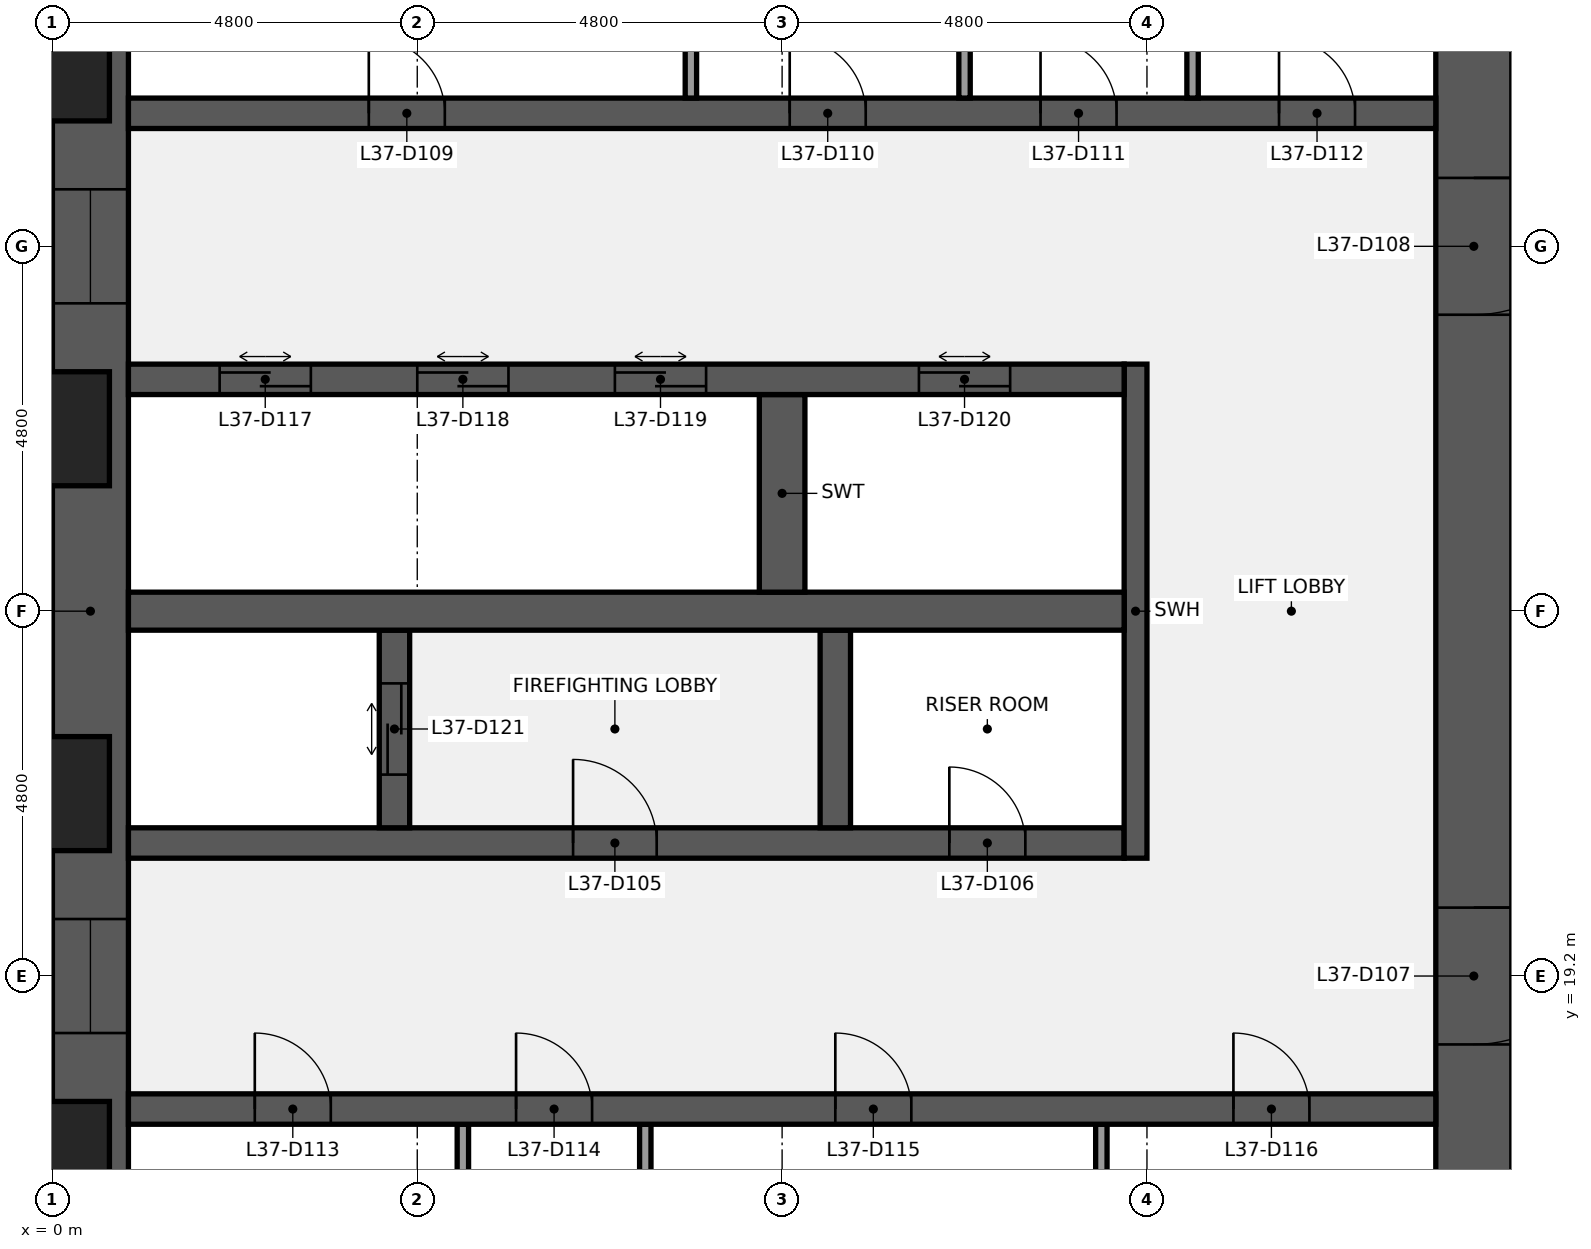
"""IFC4 building model, lengths in metres.
Left out: names, types, materials, properties, quantities, classifications, styles, units other than length and angle.
Written with IfcOpenShell. Run it as: python <this file> out.ifc"""

import sys

from ifc_helpers import new_model, si_unit, direction, frame, frame_2d, origin, place, context, subcontext, project, spatial, rectangle, extrude, element, fill, save


model = new_model("IFC4")
c1 = context("Model", 3, precision=1e-05, world=origin(), true_north=direction((0.0, 1.0)))
c2 = subcontext(c1, "Body", "Model", "MODEL_VIEW")
j1 = project(units=[si_unit("LENGTHUNIT", "METRE"), si_unit("PLANEANGLEUNIT", "RADIAN")], contexts=[c1])
p1 = place(None, origin())
s1 = spatial("IfcSite", under=j1, at=p1, CompositionType="ELEMENT")
p2 = place(p1, origin())
s2 = spatial("IfcBuilding", under=s1, at=p2, CompositionType="ELEMENT")
p3 = place(p2, frame((0.0, 0.0, 168.1)))
s3 = spatial("IfcBuildingStorey", under=s2, at=p3, CompositionType="ELEMENT", Elevation=168.1)
p4 = place(p3, frame((0.5, 9.6, 0.0), z_axis=(0.0, 0.0, 1.0), x_axis=(0.0, 1.0, 0.0)))
e1 = element("IfcWall", 1, at=p4, inside=s3, PredefinedType="SHEAR", context=c2, shape_type="SweptSolid", body=[
    extrude(rectangle(XDim=28.8, YDim=1.0, at=frame_2d((14.4, 0.0))), origin(), (0.0, 0.0, 1.0), 3.84),
])
p5 = place(p4, frame((8.85, 0.0, 0.9)))
e2 = element("IfcOpeningElement", 2, at=p5, cuts=e1, PredefinedType="OPENING", context=c2, shape_type="SweptSolid", body=[
    extrude(rectangle(XDim=1.5, YDim=1.5, at=frame_2d((0.75, 0.75))), frame((0.0, 0.51, 0.0), z_axis=(0.0, -1.0, 0.0), x_axis=(1.0, 0.0, 0.0)), (0.0, 0.0, 1.0), 1.02),
])
p6 = place(p4, frame((18.45, 0.0, 0.9)))
e3 = element("IfcOpeningElement", 3, at=p6, cuts=e1, PredefinedType="OPENING", context=c2, shape_type="SweptSolid", body=[
    extrude(rectangle(XDim=1.5, YDim=1.5, at=frame_2d((0.75, 0.75))), frame((0.0, 0.51, 0.0), z_axis=(0.0, -1.0, 0.0), x_axis=(1.0, 0.0, 0.0)), (0.0, 0.0, 1.0), 1.02),
])
p7 = place(p3, frame((18.7, 38.4, 0.0), z_axis=(0.0, 0.0, 1.0), x_axis=(0.0, -1.0, 0.0)))
e4 = element("IfcWall", 4, at=p7, inside=s3, PredefinedType="SHEAR", context=c2, shape_type="SweptSolid", body=[
    extrude(rectangle(XDim=28.8, YDim=1.0, at=frame_2d((14.4, 0.0))), origin(), (0.0, 0.0, 1.0), 3.84),
])
p8 = place(p7, frame((18.3, 0.0, 0.0)))
e5 = element("IfcOpeningElement", 5, at=p8, cuts=e4, PredefinedType="OPENING", context=c2, shape_type="SweptSolid", body=[
    extrude(rectangle(XDim=1.8, YDim=2.1, at=frame_2d((0.9, 1.05))), frame((0.0, 0.51, 0.0), z_axis=(0.0, -1.0, 0.0), x_axis=(1.0, 0.0, 0.0)), (0.0, 0.0, 1.0), 1.02),
])
p9 = place(p7, frame((8.7, 0.0, 0.0)))
e6 = element("IfcOpeningElement", 6, at=p9, cuts=e4, PredefinedType="OPENING", context=c2, shape_type="SweptSolid", body=[
    extrude(rectangle(XDim=1.8, YDim=2.1, at=frame_2d((0.9, 1.05))), frame((0.0, 0.51, 0.0), z_axis=(0.0, -1.0, 0.0), x_axis=(1.0, 0.0, 0.0)), (0.0, 0.0, 1.0), 1.02),
])
for number, where, z_axis, x_axis in (
    (7, (5.4, 14.65, 0.0), (0.0, 0.0, 1.0), (0.0, 1.0, 0.0)),
    (8, (7.8, 14.65, 0.0), (0.0, 0.0, 1.0), (0.0, 1.0, 0.0)),
    (9, (13.8, 14.65, 0.0), (0.0, 0.0, 1.0), (0.0, 1.0, 0.0)),
):
    element("IfcWall", number, at=place(p3, frame(where, z_axis=z_axis, x_axis=x_axis)), inside=s3, PredefinedType="PARTITIONING", context=c2, shape_type="SweptSolid", body=[
        extrude(rectangle(XDim=2.6, YDim=0.15, at=frame_2d((1.3, 0.0))), origin(), (0.0, 0.0, 1.0), 3.84),
    ])
p10 = place(p3, frame((1.0, 17.45, 0.0), z_axis=(0.0, 0.0, 1.0), x_axis=(1.0, 0.0, 0.0)))
e10 = element("IfcWall", 10, at=p10, inside=s3, PredefinedType="SHEAR", context=c2, shape_type="SweptSolid", body=[
    extrude(rectangle(XDim=17.2, YDim=0.4, at=frame_2d((8.6, 0.0))), origin(), (0.0, 0.0, 1.0), 3.84),
])
p11 = place(p10, frame((1.663, 0.0, 0.0)))
e11 = element("IfcOpeningElement", 11, at=p11, cuts=e10, PredefinedType="OPENING", context=c2, shape_type="SweptSolid", body=[
    extrude(rectangle(XDim=1.0, YDim=2.1, at=frame_2d((0.5, 1.05))), frame((0.0, 0.21, 0.0), z_axis=(0.0, -1.0, 0.0), x_axis=(1.0, 0.0, 0.0)), (0.0, 0.0, 1.0), 0.42),
])
p12 = place(p10, frame((5.1, 0.0, 0.0)))
e12 = element("IfcOpeningElement", 12, at=p12, cuts=e10, PredefinedType="OPENING", context=c2, shape_type="SweptSolid", body=[
    extrude(rectangle(XDim=1.0, YDim=2.1, at=frame_2d((0.5, 1.05))), frame((0.0, 0.21, 0.0), z_axis=(0.0, -1.0, 0.0), x_axis=(1.0, 0.0, 0.0)), (0.0, 0.0, 1.0), 0.42),
])
p13 = place(p10, frame((9.3, 0.0, 0.0)))
e13 = element("IfcOpeningElement", 13, at=p13, cuts=e10, PredefinedType="OPENING", context=c2, shape_type="SweptSolid", body=[
    extrude(rectangle(XDim=1.0, YDim=2.1, at=frame_2d((0.5, 1.05))), frame((0.0, 0.21, 0.0), z_axis=(0.0, -1.0, 0.0), x_axis=(1.0, 0.0, 0.0)), (0.0, 0.0, 1.0), 0.42),
])
p14 = place(p10, frame((14.538, 0.0, 0.0)))
e14 = element("IfcOpeningElement", 14, at=p14, cuts=e10, PredefinedType="OPENING", context=c2, shape_type="SweptSolid", body=[
    extrude(rectangle(XDim=1.0, YDim=2.1, at=frame_2d((0.5, 1.05))), frame((0.0, 0.21, 0.0), z_axis=(0.0, -1.0, 0.0), x_axis=(1.0, 0.0, 0.0)), (0.0, 0.0, 1.0), 0.42),
])
p15 = place(p3, frame((1.0, 20.95, 0.0), z_axis=(0.0, 0.0, 1.0), x_axis=(1.0, 0.0, 0.0)))
e15 = element("IfcWall", 15, at=p15, inside=s3, PredefinedType="SHEAR", context=c2, shape_type="SweptSolid", body=[
    extrude(rectangle(XDim=13.1, YDim=0.4, at=frame_2d((6.55, 0.0))), origin(), (0.0, 0.0, 1.0), 3.84),
])
p16 = place(p15, frame((5.85, 0.0, 0.0)))
e16 = element("IfcOpeningElement", 16, at=p16, cuts=e15, PredefinedType="OPENING", context=c2, shape_type="SweptSolid", body=[
    extrude(rectangle(XDim=1.1, YDim=2.1, at=frame_2d((0.55, 1.05))), frame((0.0, 0.21, 0.0), z_axis=(0.0, -1.0, 0.0), x_axis=(1.0, 0.0, 0.0)), (0.0, 0.0, 1.0), 0.42),
])
p17 = place(p15, frame((10.8, 0.0, 0.0)))
e17 = element("IfcOpeningElement", 17, at=p17, cuts=e15, PredefinedType="OPENING", context=c2, shape_type="SweptSolid", body=[
    extrude(rectangle(XDim=1.0, YDim=2.1, at=frame_2d((0.5, 1.05))), frame((0.0, 0.21, 0.0), z_axis=(0.0, -1.0, 0.0), x_axis=(1.0, 0.0, 0.0)), (0.0, 0.0, 1.0), 0.42),
])
p18 = place(p3, frame((14.25, 20.75, 0.0), z_axis=(0.0, 0.0, 1.0), x_axis=(0.0, 1.0, 0.0)))
e18 = element("IfcWall", 18, at=p18, inside=s3, PredefinedType="SHEAR", context=c2, shape_type="SweptSolid", body=[
    extrude(rectangle(XDim=6.5, YDim=0.3, at=frame_2d((3.25, 0.0))), origin(), (0.0, 0.0, 1.0), 3.84),
])
p19 = place(p3, frame((4.5, 21.15, 0.0), z_axis=(0.0, 0.0, 1.0), x_axis=(0.0, 1.0, 0.0)))
e19 = element("IfcWall", 19, at=p19, inside=s3, PredefinedType="SHEAR", context=c2, shape_type="SweptSolid", body=[
    extrude(rectangle(XDim=2.6, YDim=0.4, at=frame_2d((1.3, 0.0))), origin(), (0.0, 0.0, 1.0), 3.84),
])
p20 = place(p19, frame((0.7, 0.0, 0.0)))
e20 = element("IfcOpeningElement", 20, at=p20, cuts=e19, PredefinedType="OPENING", context=c2, shape_type="SweptSolid", body=[
    extrude(rectangle(XDim=1.2, YDim=2.1, at=frame_2d((0.6, 1.05))), frame((0.0, 0.21, 0.0), z_axis=(0.0, -1.0, 0.0), x_axis=(1.0, 0.0, 0.0)), (0.0, 0.0, 1.0), 0.42),
])
p21 = place(p3, frame((10.3, 21.15, 0.0), z_axis=(0.0, 0.0, 1.0), x_axis=(0.0, 1.0, 0.0)))
e21 = element("IfcWall", 21, at=p21, inside=s3, PredefinedType="SHEAR", context=c2, shape_type="SweptSolid", body=[
    extrude(rectangle(XDim=2.6, YDim=0.4, at=frame_2d((1.3, 0.0))), origin(), (0.0, 0.0, 1.0), 3.84),
])
p22 = place(p3, frame((1.0, 24.0, 0.0), z_axis=(0.0, 0.0, 1.0), x_axis=(1.0, 0.0, 0.0)))
e22 = element("IfcWall", 22, at=p22, inside=s3, PredefinedType="SHEAR", context=c2, shape_type="SweptSolid", body=[
    extrude(rectangle(XDim=13.1, YDim=0.5, at=frame_2d((6.55, 0.0))), origin(), (0.0, 0.0, 1.0), 3.84),
])
p23 = place(p3, frame((9.6, 24.25, 0.0), z_axis=(0.0, 0.0, 1.0), x_axis=(0.0, 1.0, 0.0)))
e23 = element("IfcWall", 23, at=p23, inside=s3, PredefinedType="SHEAR", context=c2, shape_type="SweptSolid", body=[
    extrude(rectangle(XDim=2.6, YDim=0.6, at=frame_2d((1.3, 0.0))), origin(), (0.0, 0.0, 1.0), 3.84),
])
p24 = place(p3, frame((1.0, 27.05, 0.0), z_axis=(0.0, 0.0, 1.0), x_axis=(1.0, 0.0, 0.0)))
e24 = element("IfcWall", 24, at=p24, inside=s3, PredefinedType="SHEAR", context=c2, shape_type="SweptSolid", body=[
    extrude(rectangle(XDim=13.1, YDim=0.4, at=frame_2d((6.55, 0.0))), origin(), (0.0, 0.0, 1.0), 3.84),
])
p25 = place(p24, frame((1.2, 0.0, 0.0)))
e25 = element("IfcOpeningElement", 25, at=p25, cuts=e24, PredefinedType="OPENING", context=c2, shape_type="SweptSolid", body=[
    extrude(rectangle(XDim=1.2, YDim=2.1, at=frame_2d((0.6, 1.05))), frame((0.0, 0.21, 0.0), z_axis=(0.0, -1.0, 0.0), x_axis=(1.0, 0.0, 0.0)), (0.0, 0.0, 1.0), 0.42),
])
p26 = place(p24, frame((3.8, 0.0, 0.0)))
e26 = element("IfcOpeningElement", 26, at=p26, cuts=e24, PredefinedType="OPENING", context=c2, shape_type="SweptSolid", body=[
    extrude(rectangle(XDim=1.2, YDim=2.1, at=frame_2d((0.6, 1.05))), frame((0.0, 0.21, 0.0), z_axis=(0.0, -1.0, 0.0), x_axis=(1.0, 0.0, 0.0)), (0.0, 0.0, 1.0), 0.42),
])
p27 = place(p24, frame((6.4, 0.0, 0.0)))
e27 = element("IfcOpeningElement", 27, at=p27, cuts=e24, PredefinedType="OPENING", context=c2, shape_type="SweptSolid", body=[
    extrude(rectangle(XDim=1.2, YDim=2.1, at=frame_2d((0.6, 1.05))), frame((0.0, 0.21, 0.0), z_axis=(0.0, -1.0, 0.0), x_axis=(1.0, 0.0, 0.0)), (0.0, 0.0, 1.0), 0.42),
])
p28 = place(p24, frame((10.4, 0.0, 0.0)))
e28 = element("IfcOpeningElement", 28, at=p28, cuts=e24, PredefinedType="OPENING", context=c2, shape_type="SweptSolid", body=[
    extrude(rectangle(XDim=1.2, YDim=2.1, at=frame_2d((0.6, 1.05))), frame((0.0, 0.21, 0.0), z_axis=(0.0, -1.0, 0.0), x_axis=(1.0, 0.0, 0.0)), (0.0, 0.0, 1.0), 0.42),
])
p29 = place(p3, frame((1.0, 30.55, 0.0), z_axis=(0.0, 0.0, 1.0), x_axis=(1.0, 0.0, 0.0)))
e29 = element("IfcWall", 29, at=p29, inside=s3, PredefinedType="SHEAR", context=c2, shape_type="SweptSolid", body=[
    extrude(rectangle(XDim=17.2, YDim=0.4, at=frame_2d((8.6, 0.0))), origin(), (0.0, 0.0, 1.0), 3.84),
])
p30 = place(p29, frame((3.163, 0.0, 0.0)))
e30 = element("IfcOpeningElement", 30, at=p30, cuts=e29, PredefinedType="OPENING", context=c2, shape_type="SweptSolid", body=[
    extrude(rectangle(XDim=1.0, YDim=2.1, at=frame_2d((0.5, 1.05))), frame((0.0, 0.21, 0.0), z_axis=(0.0, -1.0, 0.0), x_axis=(1.0, 0.0, 0.0)), (0.0, 0.0, 1.0), 0.42),
])
p31 = place(p29, frame((8.7, 0.0, 0.0)))
e31 = element("IfcOpeningElement", 31, at=p31, cuts=e29, PredefinedType="OPENING", context=c2, shape_type="SweptSolid", body=[
    extrude(rectangle(XDim=1.0, YDim=2.1, at=frame_2d((0.5, 1.05))), frame((0.0, 0.21, 0.0), z_axis=(0.0, -1.0, 0.0), x_axis=(1.0, 0.0, 0.0)), (0.0, 0.0, 1.0), 0.42),
])
p32 = place(p29, frame((12.0, 0.0, 0.0)))
e32 = element("IfcOpeningElement", 32, at=p32, cuts=e29, PredefinedType="OPENING", context=c2, shape_type="SweptSolid", body=[
    extrude(rectangle(XDim=1.0, YDim=2.1, at=frame_2d((0.5, 1.05))), frame((0.0, 0.21, 0.0), z_axis=(0.0, -1.0, 0.0), x_axis=(1.0, 0.0, 0.0)), (0.0, 0.0, 1.0), 0.42),
])
p33 = place(p29, frame((15.137, 0.0, 0.0)))
e33 = element("IfcOpeningElement", 33, at=p33, cuts=e29, PredefinedType="OPENING", context=c2, shape_type="SweptSolid", body=[
    extrude(rectangle(XDim=1.0, YDim=2.1, at=frame_2d((0.5, 1.05))), frame((0.0, 0.21, 0.0), z_axis=(0.0, -1.0, 0.0), x_axis=(1.0, 0.0, 0.0)), (0.0, 0.0, 1.0), 0.42),
])
for number, where, z_axis, x_axis in (
    (34, (8.4, 30.75, 0.0), (0.0, 0.0, 1.0), (0.0, 1.0, 0.0)),
    (35, (12.0, 30.75, 0.0), (0.0, 0.0, 1.0), (0.0, 1.0, 0.0)),
    (36, (15.0, 30.75, 0.0), (0.0, 0.0, 1.0), (0.0, 1.0, 0.0)),
):
    element("IfcWall", number, at=place(p3, frame(where, z_axis=z_axis, x_axis=x_axis)), inside=s3, PredefinedType="PARTITIONING", context=c2, shape_type="SweptSolid", body=[
        extrude(rectangle(XDim=2.6, YDim=0.15, at=frame_2d((1.3, 0.0))), origin(), (0.0, 0.0, 1.0), 3.84),
    ])
p34 = place(p16, origin())
e37 = element("IfcDoor", 37, at=p34, inside=s3, OperationType="SINGLE_SWING_LEFT", PredefinedType="DOOR", context=c2, shape_type="SweptSolid", body=[
    extrude(rectangle(XDim=1.1, YDim=2.1, at=frame_2d((0.55, 1.05))), frame((0.0, 0.025, 0.0), z_axis=(0.0, -1.0, 0.0), x_axis=(1.0, 0.0, 0.0)), (0.0, 0.0, 1.0), 0.05),
])
fill(e16, e37)
p35 = place(p17, origin())
e38 = element("IfcDoor", 38, at=p35, inside=s3, OperationType="SINGLE_SWING_LEFT", PredefinedType="DOOR", context=c2, shape_type="SweptSolid", body=[
    extrude(rectangle(XDim=1.0, YDim=2.1, at=frame_2d((0.5, 1.05))), frame((0.0, 0.025, 0.0), z_axis=(0.0, -1.0, 0.0), x_axis=(1.0, 0.0, 0.0)), (0.0, 0.0, 1.0), 0.05),
])
fill(e17, e38)
p36 = place(p8, origin())
e39 = element("IfcDoor", 39, at=p36, inside=s3, OperationType="DOUBLE_DOOR_SINGLE_SWING", PredefinedType="DOOR", context=c2, shape_type="SweptSolid", body=[
    extrude(rectangle(XDim=1.8, YDim=2.1, at=frame_2d((0.9, 1.05))), frame((0.0, 0.025, 0.0), z_axis=(0.0, -1.0, 0.0), x_axis=(1.0, 0.0, 0.0)), (0.0, 0.0, 1.0), 0.05),
])
fill(e5, e39)
p37 = place(p9, origin())
e40 = element("IfcDoor", 40, at=p37, inside=s3, OperationType="DOUBLE_DOOR_SINGLE_SWING", PredefinedType="DOOR", context=c2, shape_type="SweptSolid", body=[
    extrude(rectangle(XDim=1.8, YDim=2.1, at=frame_2d((0.9, 1.05))), frame((0.0, 0.025, 0.0), z_axis=(0.0, -1.0, 0.0), x_axis=(1.0, 0.0, 0.0)), (0.0, 0.0, 1.0), 0.05),
])
fill(e6, e40)
p38 = place(p30, origin())
e41 = element("IfcDoor", 41, at=p38, inside=s3, OperationType="SINGLE_SWING_LEFT", PredefinedType="DOOR", context=c2, shape_type="SweptSolid", body=[
    extrude(rectangle(XDim=1.0, YDim=2.1, at=frame_2d((0.5, 1.05))), frame((0.0, 0.025, 0.0), z_axis=(0.0, -1.0, 0.0), x_axis=(1.0, 0.0, 0.0)), (0.0, 0.0, 1.0), 0.05),
])
fill(e30, e41)
p39 = place(p31, origin())
e42 = element("IfcDoor", 42, at=p39, inside=s3, OperationType="SINGLE_SWING_LEFT", PredefinedType="DOOR", context=c2, shape_type="SweptSolid", body=[
    extrude(rectangle(XDim=1.0, YDim=2.1, at=frame_2d((0.5, 1.05))), frame((0.0, 0.025, 0.0), z_axis=(0.0, -1.0, 0.0), x_axis=(1.0, 0.0, 0.0)), (0.0, 0.0, 1.0), 0.05),
])
fill(e31, e42)
p40 = place(p32, origin())
e43 = element("IfcDoor", 43, at=p40, inside=s3, OperationType="SINGLE_SWING_LEFT", PredefinedType="DOOR", context=c2, shape_type="SweptSolid", body=[
    extrude(rectangle(XDim=1.0, YDim=2.1, at=frame_2d((0.5, 1.05))), frame((0.0, 0.025, 0.0), z_axis=(0.0, -1.0, 0.0), x_axis=(1.0, 0.0, 0.0)), (0.0, 0.0, 1.0), 0.05),
])
fill(e32, e43)
p41 = place(p33, origin())
e44 = element("IfcDoor", 44, at=p41, inside=s3, OperationType="SINGLE_SWING_LEFT", PredefinedType="DOOR", context=c2, shape_type="SweptSolid", body=[
    extrude(rectangle(XDim=1.0, YDim=2.1, at=frame_2d((0.5, 1.05))), frame((0.0, 0.025, 0.0), z_axis=(0.0, -1.0, 0.0), x_axis=(1.0, 0.0, 0.0)), (0.0, 0.0, 1.0), 0.05),
])
fill(e33, e44)
p42 = place(p11, origin())
e45 = element("IfcDoor", 45, at=p42, inside=s3, OperationType="SINGLE_SWING_LEFT", PredefinedType="DOOR", context=c2, shape_type="SweptSolid", body=[
    extrude(rectangle(XDim=1.0, YDim=2.1, at=frame_2d((0.5, 1.05))), frame((0.0, 0.025, 0.0), z_axis=(0.0, -1.0, 0.0), x_axis=(1.0, 0.0, 0.0)), (0.0, 0.0, 1.0), 0.05),
])
fill(e11, e45)
p43 = place(p12, origin())
e46 = element("IfcDoor", 46, at=p43, inside=s3, OperationType="SINGLE_SWING_LEFT", PredefinedType="DOOR", context=c2, shape_type="SweptSolid", body=[
    extrude(rectangle(XDim=1.0, YDim=2.1, at=frame_2d((0.5, 1.05))), frame((0.0, 0.025, 0.0), z_axis=(0.0, -1.0, 0.0), x_axis=(1.0, 0.0, 0.0)), (0.0, 0.0, 1.0), 0.05),
])
fill(e12, e46)
p44 = place(p13, origin())
e47 = element("IfcDoor", 47, at=p44, inside=s3, OperationType="SINGLE_SWING_LEFT", PredefinedType="DOOR", context=c2, shape_type="SweptSolid", body=[
    extrude(rectangle(XDim=1.0, YDim=2.1, at=frame_2d((0.5, 1.05))), frame((0.0, 0.025, 0.0), z_axis=(0.0, -1.0, 0.0), x_axis=(1.0, 0.0, 0.0)), (0.0, 0.0, 1.0), 0.05),
])
fill(e13, e47)
p45 = place(p14, origin())
e48 = element("IfcDoor", 48, at=p45, inside=s3, OperationType="SINGLE_SWING_LEFT", PredefinedType="DOOR", context=c2, shape_type="SweptSolid", body=[
    extrude(rectangle(XDim=1.0, YDim=2.1, at=frame_2d((0.5, 1.05))), frame((0.0, 0.025, 0.0), z_axis=(0.0, -1.0, 0.0), x_axis=(1.0, 0.0, 0.0)), (0.0, 0.0, 1.0), 0.05),
])
fill(e14, e48)
p46 = place(p25, origin())
e49 = element("IfcDoor", 49, at=p46, inside=s3, OperationType="DOUBLE_DOOR_SLIDING", PredefinedType="DOOR", context=c2, shape_type="SweptSolid", body=[
    extrude(rectangle(XDim=1.2, YDim=2.1, at=frame_2d((0.6, 1.05))), frame((0.0, 0.025, 0.0), z_axis=(0.0, -1.0, 0.0), x_axis=(1.0, 0.0, 0.0)), (0.0, 0.0, 1.0), 0.05),
])
fill(e25, e49)
p47 = place(p26, origin())
e50 = element("IfcDoor", 50, at=p47, inside=s3, OperationType="DOUBLE_DOOR_SLIDING", PredefinedType="DOOR", context=c2, shape_type="SweptSolid", body=[
    extrude(rectangle(XDim=1.2, YDim=2.1, at=frame_2d((0.6, 1.05))), frame((0.0, 0.025, 0.0), z_axis=(0.0, -1.0, 0.0), x_axis=(1.0, 0.0, 0.0)), (0.0, 0.0, 1.0), 0.05),
])
fill(e26, e50)
p48 = place(p27, origin())
e51 = element("IfcDoor", 51, at=p48, inside=s3, OperationType="DOUBLE_DOOR_SLIDING", PredefinedType="DOOR", context=c2, shape_type="SweptSolid", body=[
    extrude(rectangle(XDim=1.2, YDim=2.1, at=frame_2d((0.6, 1.05))), frame((0.0, 0.025, 0.0), z_axis=(0.0, -1.0, 0.0), x_axis=(1.0, 0.0, 0.0)), (0.0, 0.0, 1.0), 0.05),
])
fill(e27, e51)
p49 = place(p28, origin())
e52 = element("IfcDoor", 52, at=p49, inside=s3, OperationType="DOUBLE_DOOR_SLIDING", PredefinedType="DOOR", context=c2, shape_type="SweptSolid", body=[
    extrude(rectangle(XDim=1.2, YDim=2.1, at=frame_2d((0.6, 1.05))), frame((0.0, 0.025, 0.0), z_axis=(0.0, -1.0, 0.0), x_axis=(1.0, 0.0, 0.0)), (0.0, 0.0, 1.0), 0.05),
])
fill(e28, e52)
p50 = place(p20, origin())
e53 = element("IfcDoor", 53, at=p50, inside=s3, OperationType="DOUBLE_DOOR_SLIDING", PredefinedType="DOOR", context=c2, shape_type="SweptSolid", body=[
    extrude(rectangle(XDim=1.2, YDim=2.1, at=frame_2d((0.6, 1.05))), frame((0.0, 0.025, 0.0), z_axis=(0.0, -1.0, 0.0), x_axis=(1.0, 0.0, 0.0)), (0.0, 0.0, 1.0), 0.05),
])
fill(e20, e53)
p51 = place(p5, origin())
e54 = element("IfcWindow", 54, at=p51, inside=s3, PartitioningType="SINGLE_PANEL", PredefinedType="WINDOW", context=c2, shape_type="SweptSolid", body=[
    extrude(rectangle(XDim=1.5, YDim=1.5, at=frame_2d((0.75, 0.75))), frame((0.0, 0.03, 0.0), z_axis=(0.0, -1.0, 0.0), x_axis=(1.0, 0.0, 0.0)), (0.0, 0.0, 1.0), 0.06),
])
fill(e2, e54)
p52 = place(p6, origin())
e55 = element("IfcWindow", 55, at=p52, inside=s3, PartitioningType="SINGLE_PANEL", PredefinedType="WINDOW", context=c2, shape_type="SweptSolid", body=[
    extrude(rectangle(XDim=1.5, YDim=1.5, at=frame_2d((0.75, 0.75))), frame((0.0, 0.03, 0.0), z_axis=(0.0, -1.0, 0.0), x_axis=(1.0, 0.0, 0.0)), (0.0, 0.0, 1.0), 0.06),
])
fill(e3, e55)
save(model, sys.argv[1])
